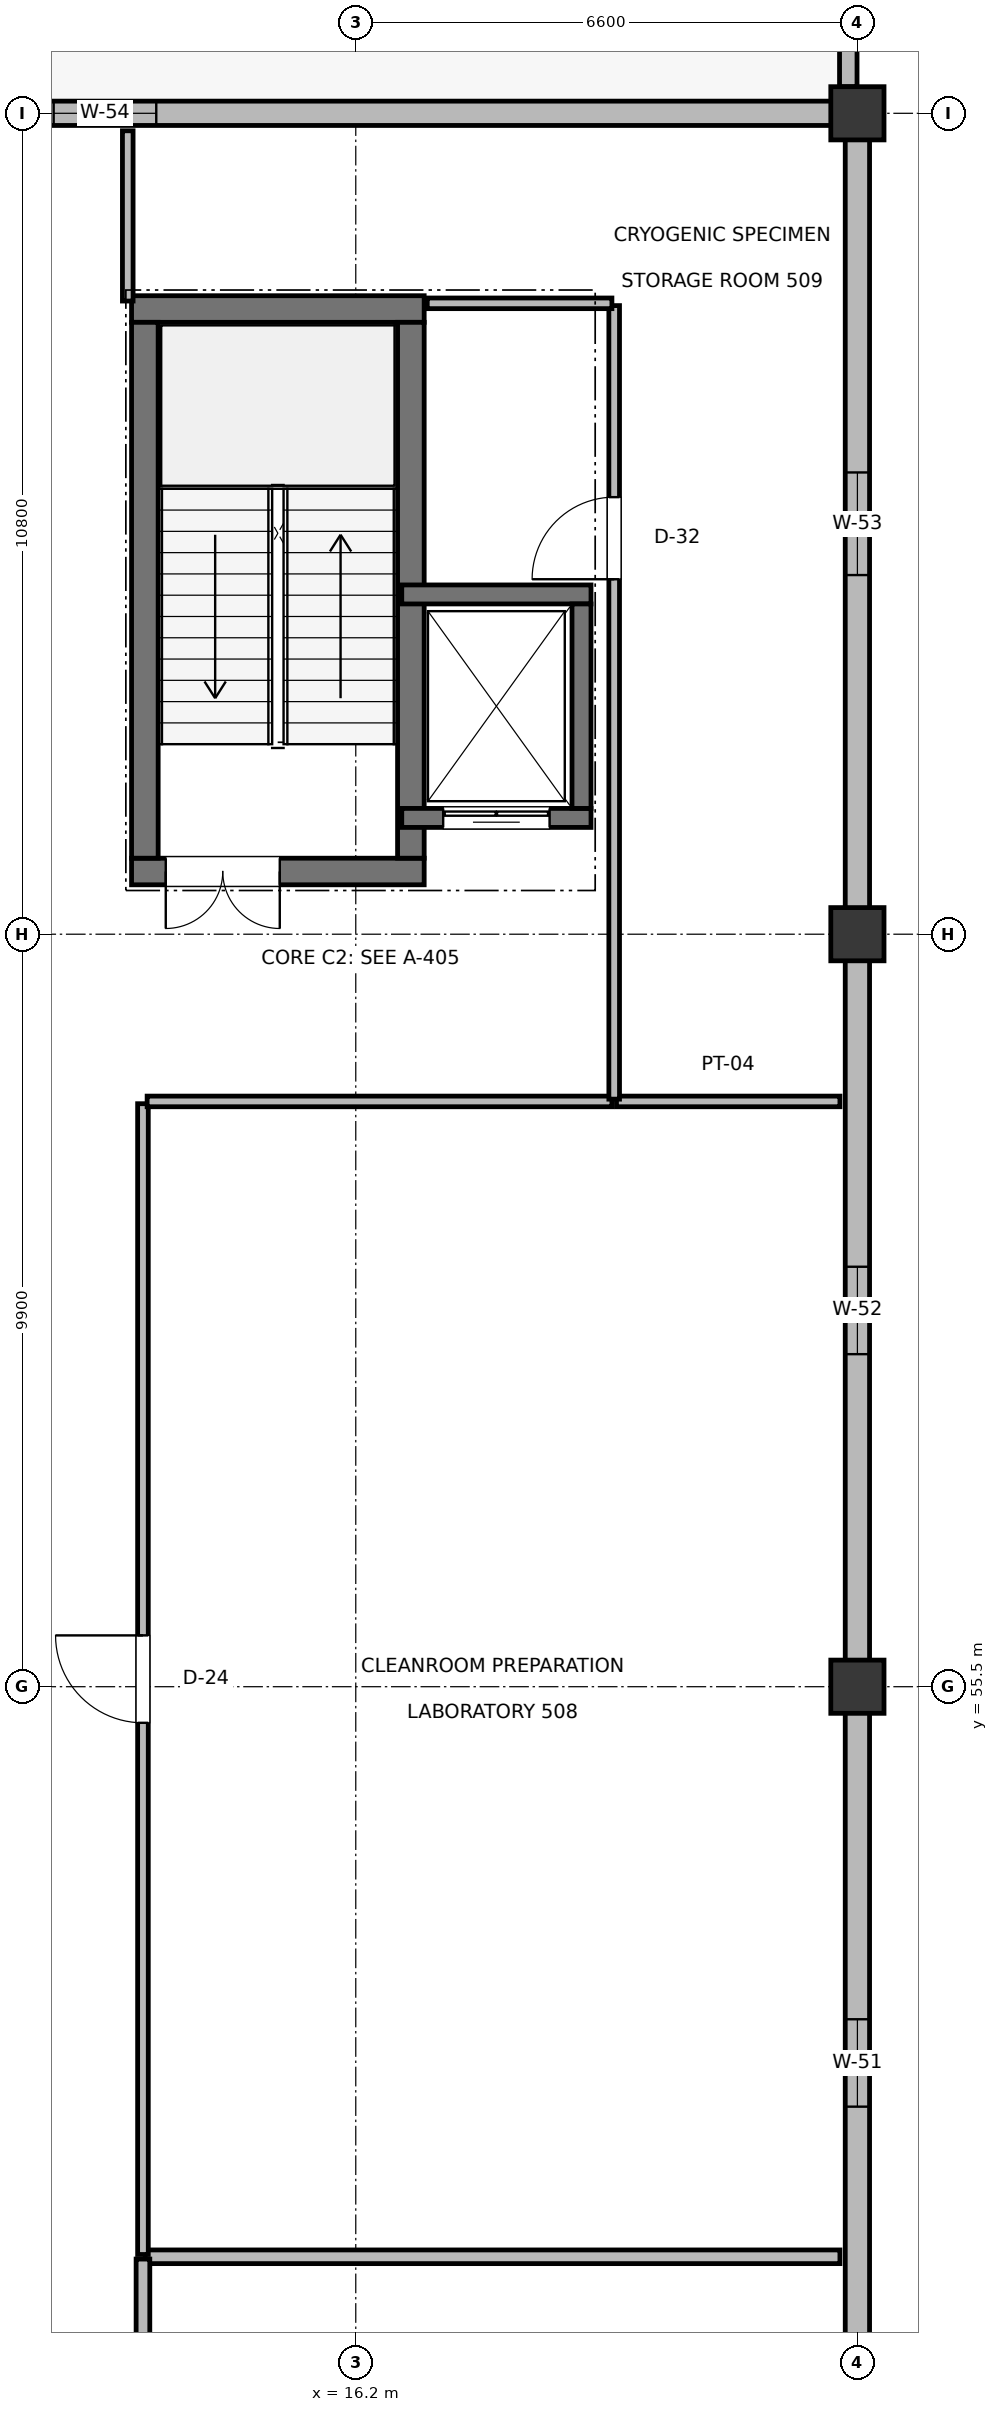
"""IFC4 building model, lengths in metres.
Left out: names, types, materials, properties, quantities, classifications, styles, units other than length and angle.
Written with IfcOpenShell. Run it as: python <this file> out.ifc"""

import sys

from ifc_helpers import new_model, si_unit, direction, frame, frame_2d, origin, origin_2d, place, context, subcontext, project, spatial, rectangle, extrude, element, fill, save


model = new_model("IFC4")
c1 = context("Model", 3, precision=1e-05, world=origin(), true_north=direction((0.0, 1.0)))
c2 = subcontext(c1, "Body", "Model", "MODEL_VIEW")
j1 = project(units=[si_unit("LENGTHUNIT", "METRE"), si_unit("PLANEANGLEUNIT", "RADIAN")], contexts=[c1])
p1 = place(None, origin())
s1 = spatial("IfcSite", under=j1, at=p1, CompositionType="ELEMENT")
p2 = place(p1, origin())
s2 = spatial("IfcBuilding", under=s1, at=p2, CompositionType="ELEMENT")
p3 = place(p2, frame((0.0, 0.0, 24.0)))
s3 = spatial("IfcBuildingStorey", under=s2, at=p3, CompositionType="ELEMENT", Elevation=24.0)
for number, where, z_axis, x_axis in (
    (1, (22.8, 55.5, 0.0), (0.0, 0.0, 1.0), (1.0, 0.0, 0.0)),
    (2, (22.8, 65.4, 0.0), (0.0, 0.0, 1.0), (1.0, 0.0, 0.0)),
    (3, (22.8, 76.2, 0.0), (0.0, 0.0, 1.0), (1.0, 0.0, 0.0)),
):
    element("IfcColumn", number, at=place(p3, frame(where, z_axis=z_axis, x_axis=x_axis)), inside=s3, PredefinedType="COLUMN", context=c2, shape_type="SweptSolid", body=[
        extrude(rectangle(XDim=0.7, YDim=0.7, at=origin_2d()), origin(), (0.0, 0.0, 1.0), 4.5),
    ])
p4 = place(p3, frame((22.8, 45.935, 0.0), z_axis=(0.0, 0.0, 1.0), x_axis=(0.0, 1.0, 0.0)))
e4 = element("IfcWall", 4, at=p4, inside=s3, PredefinedType="SOLIDWALL", context=c2, shape_type="SweptSolid", body=[
    extrude(rectangle(XDim=9.23, YDim=0.32, at=frame_2d((4.615, 0.0))), origin(), (0.0, 0.0, 1.0), 3.345),
])
p5 = place(p4, frame((4.04, 0.0, 0.9)))
e5 = element("IfcOpeningElement", 5, at=p5, cuts=e4, PredefinedType="OPENING", context=c2, shape_type="SweptSolid", body=[
    extrude(rectangle(XDim=1.15, YDim=1.55, at=frame_2d((0.575, 0.775))), frame((0.0, 0.17, 0.0), z_axis=(0.0, -1.0, 0.0), x_axis=(1.0, 0.0, 0.0)), (0.0, 0.0, 1.0), 0.34),
])
p6 = place(p3, frame((22.8, 55.835, 0.0), z_axis=(0.0, 0.0, 1.0), x_axis=(0.0, 1.0, 0.0)))
e6 = element("IfcWall", 6, at=p6, inside=s3, PredefinedType="SOLIDWALL", context=c2, shape_type="SweptSolid", body=[
    extrude(rectangle(XDim=9.23, YDim=0.32, at=frame_2d((4.615, 0.0))), origin(), (0.0, 0.0, 1.0), 3.345),
])
p7 = place(p6, frame((4.04, 0.0, 0.9)))
e7 = element("IfcOpeningElement", 7, at=p7, cuts=e6, PredefinedType="OPENING", context=c2, shape_type="SweptSolid", body=[
    extrude(rectangle(XDim=1.15, YDim=1.75, at=frame_2d((0.575, 0.875))), frame((0.0, 0.17, 0.0), z_axis=(0.0, -1.0, 0.0), x_axis=(1.0, 0.0, 0.0)), (0.0, 0.0, 1.0), 0.34),
])
p8 = place(p3, frame((22.8, 65.735, 0.0), z_axis=(0.0, 0.0, 1.0), x_axis=(0.0, 1.0, 0.0)))
e8 = element("IfcWall", 8, at=p8, inside=s3, PredefinedType="SOLIDWALL", context=c2, shape_type="SweptSolid", body=[
    extrude(rectangle(XDim=10.13, YDim=0.32, at=frame_2d((5.065, 0.0))), origin(), (0.0, 0.0, 1.0), 3.345),
])
p9 = place(p8, frame((4.39, 0.0, 0.9)))
e9 = element("IfcOpeningElement", 9, at=p9, cuts=e8, PredefinedType="OPENING", context=c2, shape_type="SweptSolid", body=[
    extrude(rectangle(XDim=1.35, YDim=1.15, at=frame_2d((0.675, 0.575))), frame((0.0, 0.17, 0.0), z_axis=(0.0, -1.0, 0.0), x_axis=(1.0, 0.0, 0.0)), (0.0, 0.0, 1.0), 0.34),
])
p10 = place(p3, frame((3.335, 76.2, 0.0), z_axis=(0.0, 0.0, 1.0), x_axis=(1.0, 0.0, 0.0)))
e10 = element("IfcWall", 10, at=p10, inside=s3, PredefinedType="SOLIDWALL", context=c2, shape_type="SweptSolid", body=[
    extrude(rectangle(XDim=19.13, YDim=0.32, at=frame_2d((9.565, 0.0))), origin(), (0.0, 0.0, 1.0), 3.395),
])
p11 = place(p10, frame((8.89, 0.0, 0.95)))
e11 = element("IfcOpeningElement", 11, at=p11, cuts=e10, PredefinedType="OPENING", context=c2, shape_type="SweptSolid", body=[
    extrude(rectangle(XDim=1.35, YDim=1.35, at=frame_2d((0.675, 0.675))), frame((0.0, 0.17, 0.0), z_axis=(0.0, -1.0, 0.0), x_axis=(1.0, 0.0, 0.0)), (0.0, 0.0, 1.0), 0.34),
])
p12 = place(p3, frame((22.68, 76.55, 0.0), z_axis=(0.0, 0.0, 1.0), x_axis=(0.0, 1.0, 0.0)))
e12 = element("IfcWall", 12, at=p12, inside=s3, PredefinedType="PARAPET", context=c2, shape_type="SweptSolid", body=[
    extrude(rectangle(XDim=14.9, YDim=0.23, at=frame_2d((7.45, 0.0))), origin(), (0.0, 0.0, 1.0), 1.05),
])
p13 = place(p3, frame((13.25, 66.225, 0.0), z_axis=(0.0, 0.0, 1.0), x_axis=(1.0, 0.0, 0.0)))
e13 = element("IfcWall", 13, at=p13, inside=s3, PredefinedType="SHEAR", context=c2, shape_type="SweptSolid", body=[
    extrude(rectangle(XDim=3.85, YDim=0.35, at=frame_2d((1.925, 0.0))), origin(), (0.0, 0.0, 1.0), 4.28),
])
p14 = place(p13, frame((0.45, 0.0, 0.0)))
e14 = element("IfcOpeningElement", 14, at=p14, cuts=e13, PredefinedType="OPENING", context=c2, shape_type="SweptSolid", body=[
    extrude(rectangle(XDim=1.5, YDim=2.2, at=frame_2d((0.75, 1.1))), frame((0.0, 0.185, 0.0), z_axis=(0.0, -1.0, 0.0), x_axis=(1.0, 0.0, 0.0)), (0.0, 0.0, 1.0), 0.37),
])
p15 = place(p3, frame((13.25, 73.625, 0.0), z_axis=(0.0, 0.0, 1.0), x_axis=(1.0, 0.0, 0.0)))
e15 = element("IfcWall", 15, at=p15, inside=s3, PredefinedType="SHEAR", context=c2, shape_type="SweptSolid", body=[
    extrude(rectangle(XDim=3.85, YDim=0.35, at=frame_2d((1.925, 0.0))), origin(), (0.0, 0.0, 1.0), 4.28),
])
for number, where, z_axis, x_axis in (
    (16, (13.425, 66.4, 0.0), (0.0, 0.0, 1.0), (0.0, 1.0, 0.0)),
    (17, (16.925, 66.4, 0.0), (0.0, 0.0, 1.0), (0.0, 1.0, 0.0)),
):
    element("IfcWall", number, at=place(p3, frame(where, z_axis=z_axis, x_axis=x_axis)), inside=s3, PredefinedType="SHEAR", context=c2, shape_type="SweptSolid", body=[
        extrude(rectangle(XDim=7.05, YDim=0.35, at=frame_2d((3.525, 0.0))), origin(), (0.0, 0.0, 1.0), 4.28),
    ])
p16 = place(p3, frame((16.805, 66.93, 0.0), z_axis=(0.0, 0.0, 1.0), x_axis=(1.0, 0.0, 0.0)))
e18 = element("IfcWall", 18, at=p16, inside=s3, PredefinedType="SHEAR", context=c2, shape_type="SweptSolid", body=[
    extrude(rectangle(XDim=2.49, YDim=0.25, at=frame_2d((1.245, 0.0))), origin(), (0.0, 0.0, 1.0), 4.26),
])
p17 = place(p16, frame((0.545, 0.0, 0.0)))
e19 = element("IfcOpeningElement", 19, at=p17, cuts=e18, PredefinedType="OPENING", context=c2, shape_type="SweptSolid", body=[
    extrude(rectangle(XDim=1.4, YDim=2.3, at=frame_2d((0.7, 1.15))), frame((0.0, 0.135, 0.0), z_axis=(0.0, -1.0, 0.0), x_axis=(1.0, 0.0, 0.0)), (0.0, 0.0, 1.0), 0.27),
])
p18 = place(p3, frame((16.805, 69.87, 0.0), z_axis=(0.0, 0.0, 1.0), x_axis=(1.0, 0.0, 0.0)))
e20 = element("IfcWall", 20, at=p18, inside=s3, PredefinedType="SHEAR", context=c2, shape_type="SweptSolid", body=[
    extrude(rectangle(XDim=2.49, YDim=0.25, at=frame_2d((1.245, 0.0))), origin(), (0.0, 0.0, 1.0), 4.26),
])
p19 = place(p3, frame((19.17, 67.055, 0.0), z_axis=(0.0, 0.0, 1.0), x_axis=(0.0, 1.0, 0.0)))
e21 = element("IfcWall", 21, at=p19, inside=s3, PredefinedType="SHEAR", context=c2, shape_type="SweptSolid", body=[
    extrude(rectangle(XDim=2.69, YDim=0.25, at=frame_2d((1.345, 0.0))), origin(), (0.0, 0.0, 1.0), 4.26),
])
p20 = place(p3, frame((13.43, 48.0, 0.0), z_axis=(0.0, 0.0, 1.0), x_axis=(1.0, 0.0, 0.0)))
e22 = element("IfcWall", 22, at=p20, inside=s3, PredefinedType="PARTITIONING", context=c2, shape_type="SweptSolid", body=[
    extrude(rectangle(XDim=9.14, YDim=0.18, at=frame_2d((4.57, 0.0))), origin(), (0.0, 0.0, 1.0), 3.345),
])
p21 = place(p3, frame((13.4, 30.03, 0.0), z_axis=(0.0, 0.0, 1.0), x_axis=(0.0, 1.0, 0.0)))
e23 = element("IfcWall", 23, at=p21, inside=s3, PredefinedType="PARTITIONING", context=c2, shape_type="SweptSolid", body=[
    extrude(rectangle(XDim=17.94, YDim=0.18, at=frame_2d((8.97, 0.0))), origin(), (0.0, 0.0, 1.0), 3.395),
])
p22 = place(p21, frame((8.445, 0.0, 0.0)))
e24 = element("IfcOpeningElement", 24, at=p22, cuts=e23, PredefinedType="OPENING", context=c2, shape_type="SweptSolid", body=[
    extrude(rectangle(XDim=1.05, YDim=2.2, at=frame_2d((0.525, 1.1))), frame((0.0, 0.1, 0.0), z_axis=(0.0, -1.0, 0.0), x_axis=(1.0, 0.0, 0.0)), (0.0, 0.0, 1.0), 0.2),
])
p23 = place(p3, frame((19.63, 63.2, 0.0), z_axis=(0.0, 0.0, 1.0), x_axis=(1.0, 0.0, 0.0)))
e25 = element("IfcWall", 25, at=p23, inside=s3, PredefinedType="PARTITIONING", context=c2, shape_type="SweptSolid", body=[
    extrude(rectangle(XDim=2.94, YDim=0.14, at=frame_2d((1.47, 0.0))), origin(), (0.0, 0.0, 1.0), 3.345),
])
p24 = place(p3, frame((13.4, 48.03, 0.0), z_axis=(0.0, 0.0, 1.0), x_axis=(0.0, 1.0, 0.0)))
e26 = element("IfcWall", 26, at=p24, inside=s3, PredefinedType="PARTITIONING", context=c2, shape_type="SweptSolid", body=[
    extrude(rectangle(XDim=15.14, YDim=0.14, at=frame_2d((7.57, 0.0))), origin(), (0.0, 0.0, 1.0), 3.395),
])
p25 = place(p24, frame((6.995, 0.0, 0.0)))
e27 = element("IfcOpeningElement", 27, at=p25, cuts=e26, PredefinedType="OPENING", context=c2, shape_type="SweptSolid", body=[
    extrude(rectangle(XDim=1.15, YDim=2.15, at=frame_2d((0.575, 1.075))), frame((0.0, 0.08, 0.0), z_axis=(0.0, -1.0, 0.0), x_axis=(1.0, 0.0, 0.0)), (0.0, 0.0, 1.0), 0.16),
])
p26 = place(p3, frame((13.455, 63.2, 0.0), z_axis=(0.0, 0.0, 1.0), x_axis=(1.0, 0.0, 0.0)))
e28 = element("IfcWall", 28, at=p26, inside=s3, PredefinedType="PARTITIONING", context=c2, shape_type="SweptSolid", body=[
    extrude(rectangle(XDim=6.115, YDim=0.14, at=frame_2d((3.058, 0.0))), origin(), (0.0, 0.0, 1.0), 3.595),
])
p27 = place(p3, frame((13.2, 73.73, 0.0), z_axis=(0.0, 0.0, 1.0), x_axis=(0.0, 1.0, 0.0)))
e29 = element("IfcWall", 29, at=p27, inside=s3, PredefinedType="PARTITIONING", context=c2, shape_type="SweptSolid", body=[
    extrude(rectangle(XDim=2.24, YDim=0.14, at=frame_2d((1.12, 0.0))), origin(), (0.0, 0.0, 1.0), 3.395),
])
p28 = place(p3, frame((19.6, 63.23, 0.0), z_axis=(0.0, 0.0, 1.0), x_axis=(0.0, 1.0, 0.0)))
e30 = element("IfcWall", 30, at=p28, inside=s3, PredefinedType="PARTITIONING", context=c2, shape_type="SweptSolid", body=[
    extrude(rectangle(XDim=10.44, YDim=0.14, at=frame_2d((5.22, 0.0))), origin(), (0.0, 0.0, 1.0), 3.395),
])
p29 = place(p28, frame((6.84, 0.0, 0.0)))
e31 = element("IfcOpeningElement", 31, at=p29, cuts=e30, PredefinedType="OPENING", context=c2, shape_type="SweptSolid", body=[
    extrude(rectangle(XDim=1.08, YDim=2.15, at=frame_2d((0.54, 1.075))), frame((0.0, 0.08, 0.0), z_axis=(0.0, -1.0, 0.0), x_axis=(1.0, 0.0, 0.0)), (0.0, 0.0, 1.0), 0.16),
])
p30 = place(p3, frame((17.14, 73.7, 0.0), z_axis=(0.0, 0.0, 1.0), x_axis=(1.0, 0.0, 0.0)))
e32 = element("IfcWall", 32, at=p30, inside=s3, PredefinedType="PARTITIONING", context=c2, shape_type="SweptSolid", body=[
    extrude(rectangle(XDim=2.43, YDim=0.14, at=frame_2d((1.215, 0.0))), origin(), (0.0, 0.0, 1.0), 4.18),
])
p31 = place(p5, frame((1.15, 0.0, 0.0), z_axis=(0.0, 0.0, 1.0), x_axis=(-1.0, 0.0, 0.0)))
e33 = element("IfcWindow", 33, at=p31, inside=s3, PartitioningType="DOUBLE_PANEL_VERTICAL", PredefinedType="WINDOW", context=c2, shape_type="SweptSolid", body=[
    extrude(rectangle(XDim=1.15, YDim=1.55, at=frame_2d((0.575, 0.775))), frame((0.0, 0.03, 0.0), z_axis=(0.0, -1.0, 0.0), x_axis=(1.0, 0.0, 0.0)), (0.0, 0.0, 1.0), 0.06),
])
fill(e5, e33)
p32 = place(p7, frame((1.15, 0.0, 0.0), z_axis=(0.0, 0.0, 1.0), x_axis=(-1.0, 0.0, 0.0)))
e34 = element("IfcWindow", 34, at=p32, inside=s3, PartitioningType="DOUBLE_PANEL_VERTICAL", PredefinedType="WINDOW", context=c2, shape_type="SweptSolid", body=[
    extrude(rectangle(XDim=1.15, YDim=1.75, at=frame_2d((0.575, 0.875))), frame((0.0, 0.03, 0.0), z_axis=(0.0, -1.0, 0.0), x_axis=(1.0, 0.0, 0.0)), (0.0, 0.0, 1.0), 0.06),
])
fill(e7, e34)
p33 = place(p9, frame((1.35, 0.0, 0.0), z_axis=(0.0, 0.0, 1.0), x_axis=(-1.0, 0.0, 0.0)))
e35 = element("IfcWindow", 35, at=p33, inside=s3, PartitioningType="DOUBLE_PANEL_VERTICAL", PredefinedType="WINDOW", context=c2, shape_type="SweptSolid", body=[
    extrude(rectangle(XDim=1.35, YDim=1.15, at=frame_2d((0.675, 0.575))), frame((0.0, 0.03, 0.0), z_axis=(0.0, -1.0, 0.0), x_axis=(1.0, 0.0, 0.0)), (0.0, 0.0, 1.0), 0.06),
])
fill(e9, e35)
p34 = place(p11, origin())
e36 = element("IfcWindow", 36, at=p34, inside=s3, PartitioningType="DOUBLE_PANEL_VERTICAL", PredefinedType="WINDOW", context=c2, shape_type="SweptSolid", body=[
    extrude(rectangle(XDim=1.35, YDim=1.35, at=frame_2d((0.675, 0.675))), frame((0.0, 0.03, 0.0), z_axis=(0.0, -1.0, 0.0), x_axis=(1.0, 0.0, 0.0)), (0.0, 0.0, 1.0), 0.06),
])
fill(e11, e36)
p35 = place(p14, frame((1.5, 0.0, 0.0), z_axis=(0.0, 0.0, 1.0), x_axis=(-1.0, 0.0, 0.0)))
e37 = element("IfcDoor", 37, at=p35, inside=s3, OperationType="DOUBLE_DOOR_SINGLE_SWING", PredefinedType="DOOR", context=c2, shape_type="SweptSolid", body=[
    extrude(rectangle(XDim=1.5, YDim=2.2, at=frame_2d((0.75, 1.1))), frame((0.0, 0.025, 0.0), z_axis=(0.0, -1.0, 0.0), x_axis=(1.0, 0.0, 0.0)), (0.0, 0.0, 1.0), 0.05),
])
fill(e14, e37)
p36 = place(p17, frame((1.4, 0.0, 0.0), z_axis=(0.0, 0.0, 1.0), x_axis=(-1.0, 0.0, 0.0)))
e38 = element("IfcDoor", 38, at=p36, inside=s3, OperationType="DOUBLE_DOOR_SLIDING", PredefinedType="DOOR", context=c2, shape_type="SweptSolid", body=[
    extrude(rectangle(XDim=1.4, YDim=2.3, at=frame_2d((0.7, 1.15))), frame((0.0, 0.025, 0.0), z_axis=(0.0, -1.0, 0.0), x_axis=(1.0, 0.0, 0.0)), (0.0, 0.0, 1.0), 0.05),
])
fill(e19, e38)
p37 = place(p25, origin())
e39 = element("IfcDoor", 39, at=p37, inside=s3, OperationType="SINGLE_SWING_RIGHT", PredefinedType="DOOR", context=c2, shape_type="SweptSolid", body=[
    extrude(rectangle(XDim=1.15, YDim=2.15, at=frame_2d((0.575, 1.075))), frame((0.0, 0.025, 0.0), z_axis=(0.0, -1.0, 0.0), x_axis=(1.0, 0.0, 0.0)), (0.0, 0.0, 1.0), 0.05),
])
fill(e27, e39)
p38 = place(p29, origin())
e40 = element("IfcDoor", 40, at=p38, inside=s3, OperationType="SINGLE_SWING_LEFT", PredefinedType="DOOR", context=c2, shape_type="SweptSolid", body=[
    extrude(rectangle(XDim=1.08, YDim=2.15, at=frame_2d((0.54, 1.075))), frame((0.0, 0.025, 0.0), z_axis=(0.0, -1.0, 0.0), x_axis=(1.0, 0.0, 0.0)), (0.0, 0.0, 1.0), 0.05),
])
fill(e31, e40)
save(model, sys.argv[1])
